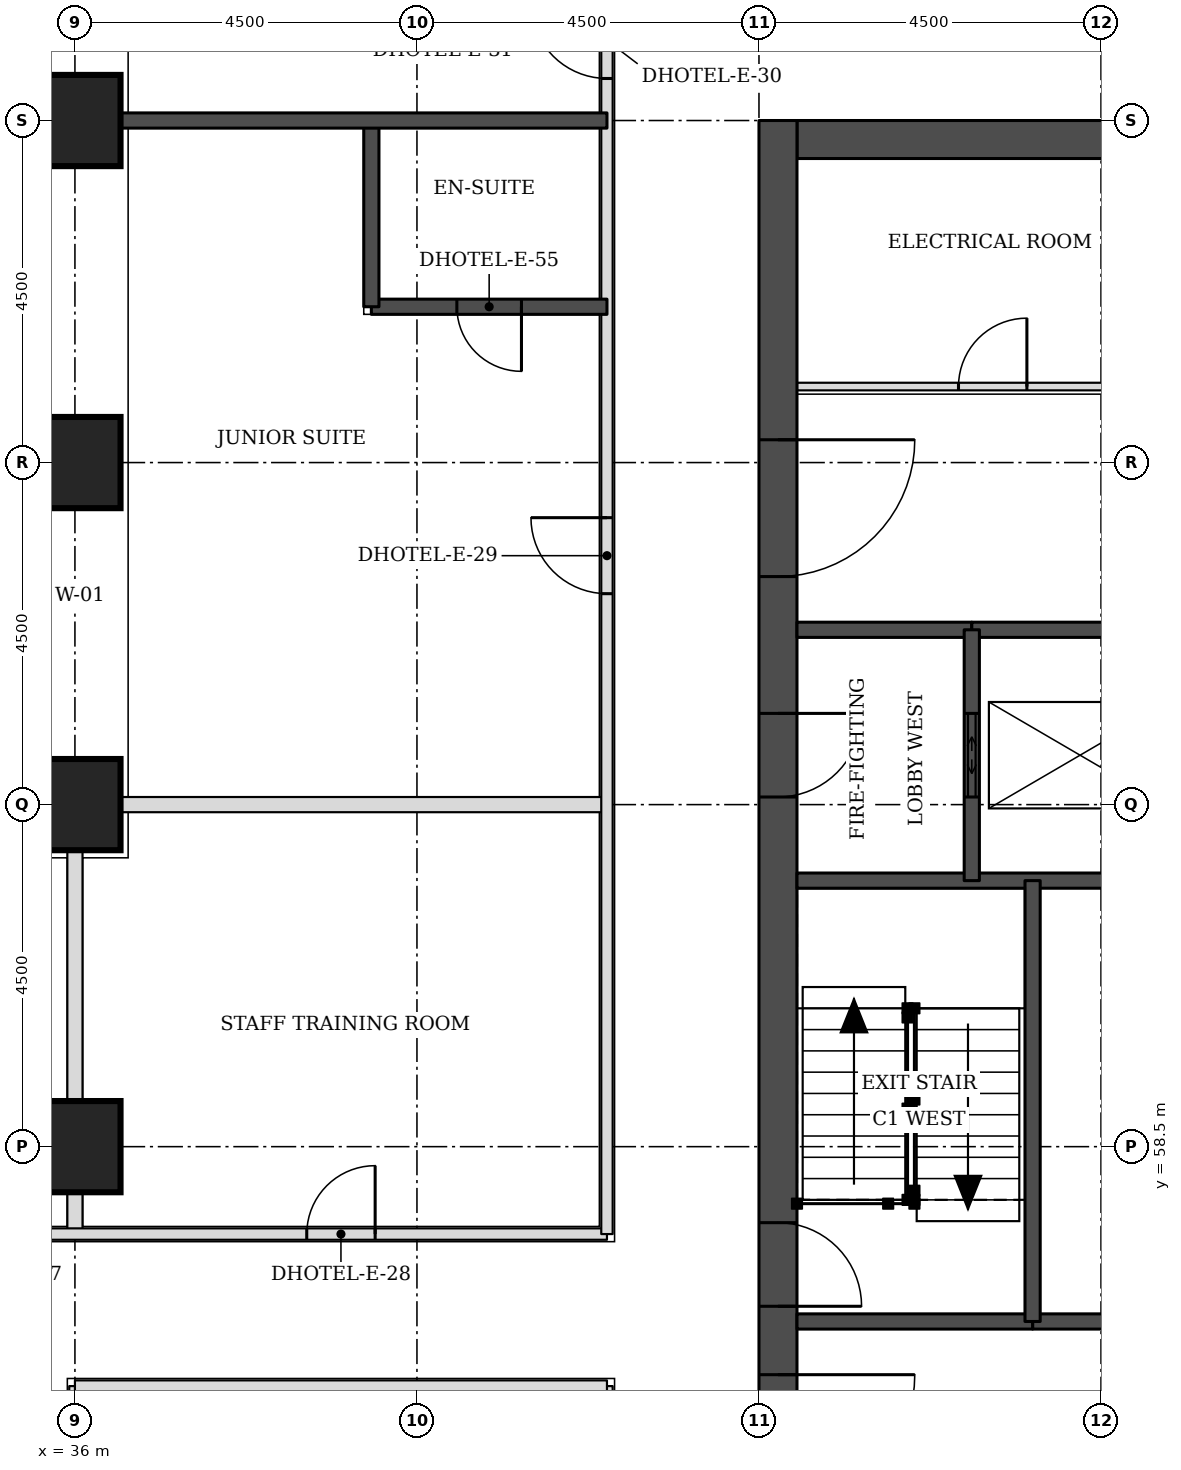
"""IFC4 building model, lengths in metres.
Left out: names, types, materials, properties, quantities, classifications, styles, units other than length and angle.
Written with IfcOpenShell. Run it as: python <this file> out.ifc"""

import sys

from ifc_helpers import new_model, si_unit, direction, frame, frame_2d, origin, origin_2d, place, context, subcontext, project, spatial, rectangle, extrude, element, fill, save


model = new_model("IFC4")
c1 = context("Model", 3, precision=1e-05, world=origin(), true_north=direction((0.0, 1.0)))
c2 = subcontext(c1, "Body", "Model", "MODEL_VIEW")
j1 = project(units=[si_unit("LENGTHUNIT", "METRE"), si_unit("PLANEANGLEUNIT", "RADIAN")], contexts=[c1])
p1 = place(None, origin())
s1 = spatial("IfcSite", under=j1, at=p1, CompositionType="ELEMENT")
p2 = place(p1, origin())
s2 = spatial("IfcBuilding", under=s1, at=p2, CompositionType="ELEMENT")
p3 = place(p2, frame((0.0, 0.0, 62.7)))
s3 = spatial("IfcBuildingStorey", under=s2, at=p3, CompositionType="ELEMENT", Elevation=62.7)
for number, where, z_axis, x_axis in (
    (1, (36.0, 58.5, 0.0), (0.0, 0.0, 1.0), (1.0, 0.0, 0.0)),
    (2, (36.0, 63.0, 0.0), (0.0, 0.0, 1.0), (1.0, 0.0, 0.0)),
    (3, (36.0, 67.5, 0.0), (0.0, 0.0, 1.0), (1.0, 0.0, 0.0)),
    (4, (36.0, 72.0, 0.0), (0.0, 0.0, 1.0), (1.0, 0.0, 0.0)),
):
    element("IfcColumn", number, at=place(p3, frame(where, z_axis=z_axis, x_axis=x_axis)), inside=s3, PredefinedType="COLUMN", context=c2, shape_type="SweptSolid", body=[
        extrude(rectangle(XDim=1.2, YDim=1.2, at=origin_2d()), origin(), (0.0, 0.0, 1.0), 3.3),
    ])
p4 = place(p3, frame((45.5, 71.75, 0.0), z_axis=(0.0, 0.0, 1.0), x_axis=(1.0, 0.0, 0.0)))
e5 = element("IfcWall", 5, at=p4, inside=s3, PredefinedType="SHEAR", context=c2, shape_type="SweptSolid", body=[
    extrude(rectangle(XDim=21.5, YDim=0.5, at=frame_2d((10.75, 0.0))), origin(), (0.0, 0.0, 1.0), 3.3),
])
p5 = place(p3, frame((45.25, 49.5, 0.0), z_axis=(0.0, 0.0, 1.0), x_axis=(0.0, 1.0, 0.0)))
e6 = element("IfcWall", 6, at=p5, inside=s3, PredefinedType="SHEAR", context=c2, shape_type="SweptSolid", body=[
    extrude(rectangle(XDim=22.5, YDim=0.5, at=frame_2d((11.25, 0.0))), origin(), (0.0, 0.0, 1.0), 3.3),
])
p6 = place(p5, frame((4.2, 0.0, 0.0)))
e7 = element("IfcOpeningElement", 7, at=p6, cuts=e6, PredefinedType="OPENING", context=c2, shape_type="SweptSolid", body=[
    extrude(rectangle(XDim=1.8, YDim=2.1, at=frame_2d((0.9, 1.05))), frame((0.0, 0.26, 0.0), z_axis=(0.0, -1.0, 0.0), x_axis=(1.0, 0.0, 0.0)), (0.0, 0.0, 1.0), 0.52),
])
p7 = place(p5, frame((6.9, 0.0, 0.0)))
e8 = element("IfcOpeningElement", 8, at=p7, cuts=e6, PredefinedType="OPENING", context=c2, shape_type="SweptSolid", body=[
    extrude(rectangle(XDim=1.1, YDim=2.1, at=frame_2d((0.55, 1.05))), frame((0.0, 0.26, 0.0), z_axis=(0.0, -1.0, 0.0), x_axis=(1.0, 0.0, 0.0)), (0.0, 0.0, 1.0), 0.52),
])
p8 = place(p5, frame((13.6, 0.0, 0.0)))
e9 = element("IfcOpeningElement", 9, at=p8, cuts=e6, PredefinedType="OPENING", context=c2, shape_type="SweptSolid", body=[
    extrude(rectangle(XDim=1.1, YDim=2.1, at=frame_2d((0.55, 1.05))), frame((0.0, 0.26, 0.0), z_axis=(0.0, -1.0, 0.0), x_axis=(1.0, 0.0, 0.0)), (0.0, 0.0, 1.0), 0.52),
])
p9 = place(p5, frame((16.5, 0.0, 0.0)))
e10 = element("IfcOpeningElement", 10, at=p9, cuts=e6, PredefinedType="OPENING", context=c2, shape_type="SweptSolid", body=[
    extrude(rectangle(XDim=1.8, YDim=2.1, at=frame_2d((0.9, 1.05))), frame((0.0, 0.26, 0.0), z_axis=(0.0, -1.0, 0.0), x_axis=(1.0, 0.0, 0.0)), (0.0, 0.0, 1.0), 0.52),
])
p10 = place(p3, frame((36.0, 57.35, 0.0), z_axis=(0.0, 0.0, 1.0), x_axis=(0.0, 1.0, 0.0)))
e11 = element("IfcWall", 11, at=p10, inside=s3, PredefinedType="PARTITIONING", context=c2, shape_type="SweptSolid", body=[
    extrude(rectangle(XDim=5.05, YDim=0.2, at=frame_2d((2.525, 0.0))), origin(), (0.0, 0.0, 1.0), 2.33),
])
p11 = place(p3, frame((36.6, 63.0, 0.0), z_axis=(0.0, 0.0, 1.0), x_axis=(1.0, 0.0, 0.0)))
e12 = element("IfcWall", 12, at=p11, inside=s3, PredefinedType="PARTITIONING", context=c2, shape_type="SweptSolid", body=[
    extrude(rectangle(XDim=6.4, YDim=0.2, at=frame_2d((3.2, 0.0))), origin(), (0.0, 0.0, 1.0), 3.08),
])
p12 = place(p3, frame((43.0, 47.5, 0.0), z_axis=(0.0, 0.0, 1.0), x_axis=(0.0, 1.0, 0.0)))
e13 = element("IfcWall", 13, at=p12, inside=s3, PredefinedType="PARTITIONING", context=c2, shape_type="SweptSolid", body=[
    extrude(rectangle(XDim=7.85, YDim=0.15, at=frame_2d((3.925, 0.0))), origin(), (0.0, 0.0, 1.0), 3.08),
])
p13 = place(p12, frame((3.475, 0.0, 0.0)))
e14 = element("IfcOpeningElement", 14, at=p13, cuts=e13, PredefinedType="OPENING", context=c2, shape_type="SweptSolid", body=[
    extrude(rectangle(XDim=0.9, YDim=2.1, at=frame_2d((0.45, 1.05))), frame((0.0, 0.085, 0.0), z_axis=(0.0, -1.0, 0.0), x_axis=(1.0, 0.0, 0.0)), (0.0, 0.0, 1.0), 0.17),
])
p14 = place(p3, frame((36.0, 54.05, 0.0), z_axis=(0.0, 0.0, 1.0), x_axis=(0.0, 1.0, 0.0)))
e15 = element("IfcWall", 15, at=p14, inside=s3, PredefinedType="PARTITIONING", context=c2, shape_type="SweptSolid", body=[
    extrude(rectangle(XDim=1.3, YDim=0.15, at=frame_2d((0.65, 0.0))), origin(), (0.0, 0.0, 1.0), 2.33),
])
p15 = place(p3, frame((36.0, 55.35, 0.0), z_axis=(0.0, 0.0, 1.0), x_axis=(1.0, 0.0, 0.0)))
e16 = element("IfcWall", 16, at=p15, inside=s3, PredefinedType="PARTITIONING", context=c2, shape_type="SweptSolid", body=[
    extrude(rectangle(XDim=7.0, YDim=0.15, at=frame_2d((3.5, 0.0))), origin(), (0.0, 0.0, 1.0), 3.08),
])
p16 = place(p3, frame((29.38, 57.35, 0.0), z_axis=(0.0, 0.0, 1.0), x_axis=(1.0, 0.0, 0.0)))
e17 = element("IfcWall", 17, at=p16, inside=s3, PredefinedType="PARTITIONING", context=c2, shape_type="SweptSolid", body=[
    extrude(rectangle(XDim=13.62, YDim=0.15, at=frame_2d((6.81, 0.0))), origin(), (0.0, 0.0, 1.0), 3.08),
])
p17 = place(p16, frame((5.02, 0.0, 0.0)))
e18 = element("IfcOpeningElement", 18, at=p17, cuts=e17, PredefinedType="OPENING", context=c2, shape_type="SweptSolid", body=[
    extrude(rectangle(XDim=1.0, YDim=2.1, at=frame_2d((0.5, 1.05))), frame((0.0, 0.085, 0.0), z_axis=(0.0, -1.0, 0.0), x_axis=(1.0, 0.0, 0.0)), (0.0, 0.0, 1.0), 0.17),
])
p18 = place(p16, frame((9.67, 0.0, 0.0)))
e19 = element("IfcOpeningElement", 19, at=p18, cuts=e17, PredefinedType="OPENING", context=c2, shape_type="SweptSolid", body=[
    extrude(rectangle(XDim=0.9, YDim=2.1, at=frame_2d((0.45, 1.05))), frame((0.0, 0.085, 0.0), z_axis=(0.0, -1.0, 0.0), x_axis=(1.0, 0.0, 0.0)), (0.0, 0.0, 1.0), 0.17),
])
p19 = place(p3, frame((43.0, 57.35, 0.0), z_axis=(0.0, 0.0, 1.0), x_axis=(0.0, 1.0, 0.0)))
e20 = element("IfcWall", 20, at=p19, inside=s3, PredefinedType="PARTITIONING", context=c2, shape_type="SweptSolid", body=[
    extrude(rectangle(XDim=16.65, YDim=0.15, at=frame_2d((8.325, 0.0))), origin(), (0.0, 0.0, 1.0), 3.08),
])
p20 = place(p19, frame((8.425, 0.0, 0.0)))
e21 = element("IfcOpeningElement", 21, at=p20, cuts=e20, PredefinedType="OPENING", context=c2, shape_type="SweptSolid", body=[
    extrude(rectangle(XDim=1.0, YDim=2.1, at=frame_2d((0.5, 1.05))), frame((0.0, 0.085, 0.0), z_axis=(0.0, -1.0, 0.0), x_axis=(1.0, 0.0, 0.0)), (0.0, 0.0, 1.0), 0.17),
])
p21 = place(p19, frame((15.203, 0.0, 0.0)))
e22 = element("IfcOpeningElement", 22, at=p21, cuts=e20, PredefinedType="OPENING", context=c2, shape_type="SweptSolid", body=[
    extrude(rectangle(XDim=1.0, YDim=2.1, at=frame_2d((0.5, 1.05))), frame((0.0, 0.085, 0.0), z_axis=(0.0, -1.0, 0.0), x_axis=(1.0, 0.0, 0.0)), (0.0, 0.0, 1.0), 0.17),
])
p22 = place(p3, frame((39.9, 69.55, 0.0), z_axis=(0.0, 0.0, 1.0), x_axis=(1.0, 0.0, 0.0)))
e23 = element("IfcWall", 23, at=p22, inside=s3, PredefinedType="SOLIDWALL", context=c2, shape_type="SweptSolid", body=[
    extrude(rectangle(XDim=3.1, YDim=0.2, at=frame_2d((1.55, 0.0))), origin(), (0.0, 0.0, 1.0), 3.08),
])
p23 = place(p22, frame((1.125, 0.0, 0.0)))
e24 = element("IfcOpeningElement", 24, at=p23, cuts=e23, PredefinedType="OPENING", context=c2, shape_type="SweptSolid", body=[
    extrude(rectangle(XDim=0.85, YDim=2.1, at=frame_2d((0.425, 1.05))), frame((0.0, 0.11, 0.0), z_axis=(0.0, -1.0, 0.0), x_axis=(1.0, 0.0, 0.0)), (0.0, 0.0, 1.0), 0.22),
])
p24 = place(p3, frame((39.9, 69.55, 0.0), z_axis=(0.0, 0.0, 1.0), x_axis=(0.0, 1.0, 0.0)))
e25 = element("IfcWall", 25, at=p24, inside=s3, PredefinedType="SOLIDWALL", context=c2, shape_type="SweptSolid", body=[
    extrude(rectangle(XDim=2.45, YDim=0.2, at=frame_2d((1.225, 0.0))), origin(), (0.0, 0.0, 1.0), 3.08),
])
p25 = place(p3, frame((36.6, 72.0, 0.0), z_axis=(0.0, 0.0, 1.0), x_axis=(1.0, 0.0, 0.0)))
e26 = element("IfcWall", 26, at=p25, inside=s3, PredefinedType="SOLIDWALL", context=c2, shape_type="SweptSolid", body=[
    extrude(rectangle(XDim=6.4, YDim=0.2, at=frame_2d((3.2, 0.0))), origin(), (0.0, 0.0, 1.0), 3.08),
])
p26 = place(p3, frame((48.6, 56.2, 0.0), z_axis=(0.0, 0.0, 1.0), x_axis=(1.0, 0.0, 0.0)))
e27 = element("IfcWall", 27, at=p26, inside=s3, PredefinedType="SOLIDWALL", context=c2, shape_type="SweptSolid", body=[
    extrude(rectangle(XDim=2.05, YDim=0.2, at=frame_2d((1.025, 0.0))), origin(), (0.0, 0.0, 1.0), 3.08),
])
p27 = place(p3, frame((45.5, 56.2, 0.0), z_axis=(0.0, 0.0, 1.0), x_axis=(1.0, 0.0, 0.0)))
e28 = element("IfcWall", 28, at=p27, inside=s3, PredefinedType="SOLIDWALL", context=c2, shape_type="SweptSolid", body=[
    extrude(rectangle(XDim=3.1, YDim=0.2, at=frame_2d((1.55, 0.0))), origin(), (0.0, 0.0, 1.0), 3.08),
])
p28 = place(p3, frame((45.5, 62.0, 0.0), z_axis=(0.0, 0.0, 1.0), x_axis=(1.0, 0.0, 0.0)))
e29 = element("IfcWall", 29, at=p28, inside=s3, PredefinedType="SOLIDWALL", context=c2, shape_type="SweptSolid", body=[
    extrude(rectangle(XDim=5.15, YDim=0.2, at=frame_2d((2.575, 0.0))), origin(), (0.0, 0.0, 1.0), 3.08),
])
p29 = place(p3, frame((45.5, 65.3, 0.0), z_axis=(0.0, 0.0, 1.0), x_axis=(1.0, 0.0, 0.0)))
e30 = element("IfcWall", 30, at=p29, inside=s3, PredefinedType="SOLIDWALL", context=c2, shape_type="SweptSolid", body=[
    extrude(rectangle(XDim=2.3, YDim=0.2, at=frame_2d((1.15, 0.0))), origin(), (0.0, 0.0, 1.0), 3.08),
])
p30 = place(p3, frame((47.8, 65.3, 0.0), z_axis=(0.0, 0.0, 1.0), x_axis=(1.0, 0.0, 0.0)))
e31 = element("IfcWall", 31, at=p30, inside=s3, PredefinedType="SOLIDWALL", context=c2, shape_type="SweptSolid", body=[
    extrude(rectangle(XDim=16.9, YDim=0.2, at=frame_2d((8.45, 0.0))), origin(), (0.0, 0.0, 1.0), 3.08),
])
p31 = place(p3, frame((45.5, 68.5, 0.0), z_axis=(0.0, 0.0, 1.0), x_axis=(1.0, 0.0, 0.0)))
e32 = element("IfcWall", 32, at=p31, inside=s3, PredefinedType="PARTITIONING", context=c2, shape_type="SweptSolid", body=[
    extrude(rectangle(XDim=5.15, YDim=0.1, at=frame_2d((2.575, 0.0))), origin(), (0.0, 0.0, 1.0), 3.08),
])
p32 = place(p31, frame((2.125, 0.0, 0.0)))
e33 = element("IfcOpeningElement", 33, at=p32, cuts=e32, PredefinedType="OPENING", context=c2, shape_type="SweptSolid", body=[
    extrude(rectangle(XDim=0.9, YDim=2.1, at=frame_2d((0.45, 1.05))), frame((0.0, 0.06, 0.0), z_axis=(0.0, -1.0, 0.0), x_axis=(1.0, 0.0, 0.0)), (0.0, 0.0, 1.0), 0.12),
])
p33 = place(p3, frame((47.8, 62.0, 0.0), z_axis=(0.0, 0.0, 1.0), x_axis=(0.0, 1.0, 0.0)))
e34 = element("IfcWall", 34, at=p33, inside=s3, PredefinedType="SOLIDWALL", context=c2, shape_type="SweptSolid", body=[
    extrude(rectangle(XDim=3.3, YDim=0.2, at=frame_2d((1.65, 0.0))), origin(), (0.0, 0.0, 1.0), 3.08),
])
p34 = place(p33, frame((1.1, 0.0, 0.0)))
e35 = element("IfcOpeningElement", 35, at=p34, cuts=e34, PredefinedType="OPENING", context=c2, shape_type="SweptSolid", body=[
    extrude(rectangle(XDim=1.1, YDim=2.1, at=frame_2d((0.55, 1.05))), frame((0.0, 0.11, 0.0), z_axis=(0.0, -1.0, 0.0), x_axis=(1.0, 0.0, 0.0)), (0.0, 0.0, 1.0), 0.22),
])
p35 = place(p3, frame((48.6, 56.2, 0.0), z_axis=(0.0, 0.0, 1.0), x_axis=(0.0, 1.0, 0.0)))
e36 = element("IfcWall", 36, at=p35, inside=s3, PredefinedType="SOLIDWALL", context=c2, shape_type="SweptSolid", body=[
    extrude(rectangle(XDim=5.8, YDim=0.2, at=frame_2d((2.9, 0.0))), origin(), (0.0, 0.0, 1.0), 3.08),
])
p36 = place(p20, origin())
e37 = element("IfcDoor", 37, at=p36, inside=s3, OperationType="SINGLE_SWING_RIGHT", PredefinedType="DOOR", context=c2, shape_type="SweptSolid", body=[
    extrude(rectangle(XDim=1.0, YDim=2.1, at=frame_2d((0.5, 1.05))), frame((0.0, 0.025, 0.0), z_axis=(0.0, -1.0, 0.0), x_axis=(1.0, 0.0, 0.0)), (0.0, 0.0, 1.0), 0.05),
])
fill(e21, e37)
p37 = place(p23, frame((0.85, 0.0, 0.0), z_axis=(0.0, 0.0, 1.0), x_axis=(-1.0, 0.0, 0.0)))
e38 = element("IfcDoor", 38, at=p37, inside=s3, OperationType="SINGLE_SWING_LEFT", PredefinedType="DOOR", context=c2, shape_type="SweptSolid", body=[
    extrude(rectangle(XDim=0.85, YDim=2.1, at=frame_2d((0.425, 1.05))), frame((0.0, 0.025, 0.0), z_axis=(0.0, -1.0, 0.0), x_axis=(1.0, 0.0, 0.0)), (0.0, 0.0, 1.0), 0.05),
])
fill(e24, e38)
p38 = place(p21, origin())
e39 = element("IfcDoor", 39, at=p38, inside=s3, OperationType="SINGLE_SWING_RIGHT", PredefinedType="DOOR", context=c2, shape_type="SweptSolid", body=[
    extrude(rectangle(XDim=1.0, YDim=2.1, at=frame_2d((0.5, 1.05))), frame((0.0, 0.025, 0.0), z_axis=(0.0, -1.0, 0.0), x_axis=(1.0, 0.0, 0.0)), (0.0, 0.0, 1.0), 0.05),
])
fill(e22, e39)
p39 = place(p18, origin())
e40 = element("IfcDoor", 40, at=p39, inside=s3, OperationType="SINGLE_SWING_RIGHT", PredefinedType="DOOR", context=c2, shape_type="SweptSolid", body=[
    extrude(rectangle(XDim=0.9, YDim=2.1, at=frame_2d((0.45, 1.05))), frame((0.0, 0.025, 0.0), z_axis=(0.0, -1.0, 0.0), x_axis=(1.0, 0.0, 0.0)), (0.0, 0.0, 1.0), 0.05),
])
fill(e19, e40)
p40 = place(p34, origin())
e41 = element("IfcDoor", 41, at=p40, inside=s3, OperationType="DOUBLE_DOOR_SLIDING", PredefinedType="DOOR", context=c2, shape_type="SweptSolid", body=[
    extrude(rectangle(XDim=1.1, YDim=2.1, at=frame_2d((0.55, 1.05))), frame((0.0, 0.025, 0.0), z_axis=(0.0, -1.0, 0.0), x_axis=(1.0, 0.0, 0.0)), (0.0, 0.0, 1.0), 0.05),
])
fill(e35, e41)
p41 = place(p6, frame((1.8, 0.0, 0.0), z_axis=(0.0, 0.0, 1.0), x_axis=(-1.0, 0.0, 0.0)))
e42 = element("IfcDoor", 42, at=p41, inside=s3, OperationType="SINGLE_SWING_LEFT", PredefinedType="DOOR", context=c2, shape_type="SweptSolid", body=[
    extrude(rectangle(XDim=1.8, YDim=2.1, at=frame_2d((0.9, 1.05))), frame((0.0, 0.025, 0.0), z_axis=(0.0, -1.0, 0.0), x_axis=(1.0, 0.0, 0.0)), (0.0, 0.0, 1.0), 0.05),
])
fill(e7, e42)
p42 = place(p7, frame((1.1, 0.0, 0.0), z_axis=(0.0, 0.0, 1.0), x_axis=(-1.0, 0.0, 0.0)))
e43 = element("IfcDoor", 43, at=p42, inside=s3, OperationType="SINGLE_SWING_RIGHT", PredefinedType="DOOR", context=c2, shape_type="SweptSolid", body=[
    extrude(rectangle(XDim=1.1, YDim=2.1, at=frame_2d((0.55, 1.05))), frame((0.0, 0.025, 0.0), z_axis=(0.0, -1.0, 0.0), x_axis=(1.0, 0.0, 0.0)), (0.0, 0.0, 1.0), 0.05),
])
fill(e8, e43)
p43 = place(p8, frame((1.1, 0.0, 0.0), z_axis=(0.0, 0.0, 1.0), x_axis=(-1.0, 0.0, 0.0)))
e44 = element("IfcDoor", 44, at=p43, inside=s3, OperationType="SINGLE_SWING_LEFT", PredefinedType="DOOR", context=c2, shape_type="SweptSolid", body=[
    extrude(rectangle(XDim=1.1, YDim=2.1, at=frame_2d((0.55, 1.05))), frame((0.0, 0.025, 0.0), z_axis=(0.0, -1.0, 0.0), x_axis=(1.0, 0.0, 0.0)), (0.0, 0.0, 1.0), 0.05),
])
fill(e9, e44)
p44 = place(p9, frame((1.8, 0.0, 0.0), z_axis=(0.0, 0.0, 1.0), x_axis=(-1.0, 0.0, 0.0)))
e45 = element("IfcDoor", 45, at=p44, inside=s3, OperationType="SINGLE_SWING_LEFT", PredefinedType="DOOR", context=c2, shape_type="SweptSolid", body=[
    extrude(rectangle(XDim=1.8, YDim=2.1, at=frame_2d((0.9, 1.05))), frame((0.0, 0.025, 0.0), z_axis=(0.0, -1.0, 0.0), x_axis=(1.0, 0.0, 0.0)), (0.0, 0.0, 1.0), 0.05),
])
fill(e10, e45)
p45 = place(p32, origin())
e46 = element("IfcDoor", 46, at=p45, inside=s3, OperationType="SINGLE_SWING_RIGHT", PredefinedType="DOOR", context=c2, shape_type="SweptSolid", body=[
    extrude(rectangle(XDim=0.9, YDim=2.1, at=frame_2d((0.45, 1.05))), frame((0.0, 0.025, 0.0), z_axis=(0.0, -1.0, 0.0), x_axis=(1.0, 0.0, 0.0)), (0.0, 0.0, 1.0), 0.05),
])
fill(e33, e46)
save(model, sys.argv[1])
